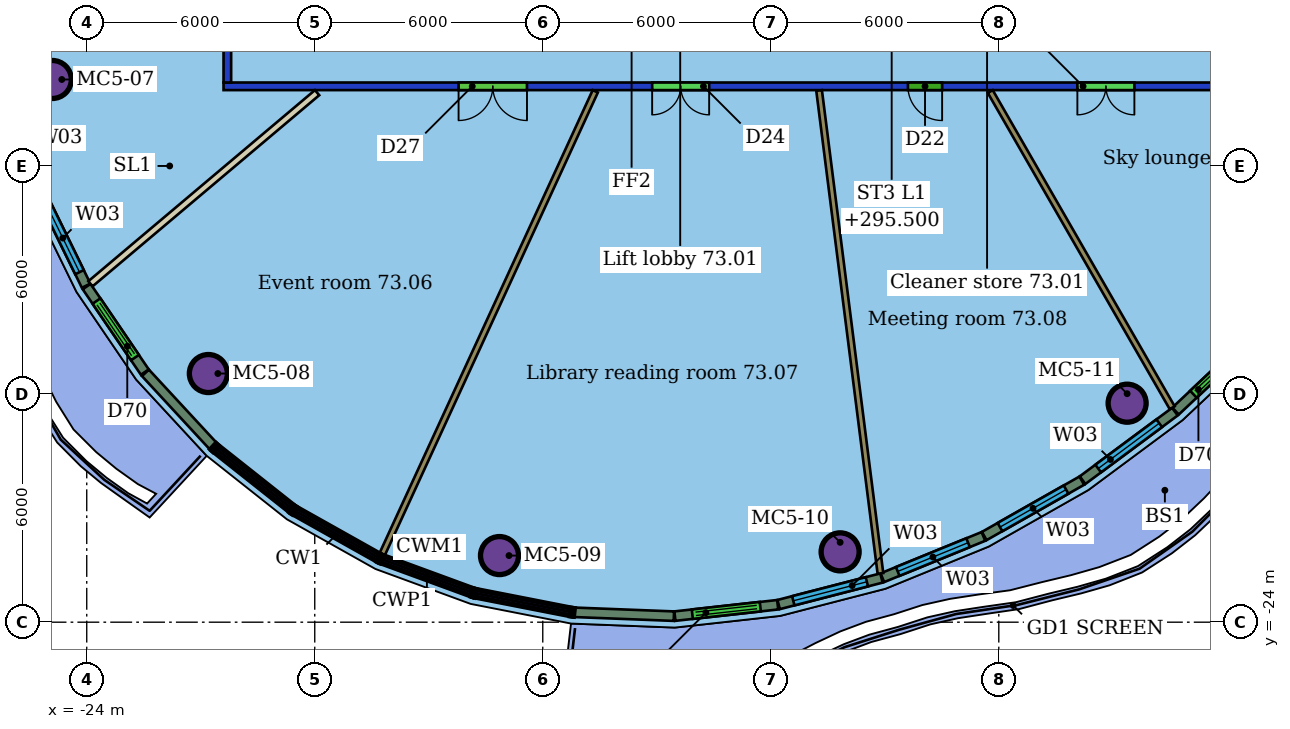
"""IFC4 building model, lengths in metres.
Left out: names, types, materials, properties, quantities, classifications, styles, units other than length and angle.
Written with IfcOpenShell. Run it as: python <this file> out.ifc"""

import sys

from ifc_helpers import new_model, si_unit, direction, frame, frame_2d, origin, origin_2d, place, context, subcontext, project, spatial, rectangle, hollow_circle, extrude, element, fill, save


model = new_model("IFC4")
c1 = context("Model", 3, precision=1e-05, world=origin(), true_north=direction((0.0, 1.0)))
c2 = subcontext(c1, "Body", "Model", "MODEL_VIEW")
j1 = project(units=[si_unit("LENGTHUNIT", "METRE"), si_unit("PLANEANGLEUNIT", "RADIAN")], contexts=[c1])
p1 = place(None, origin())
s1 = spatial("IfcSite", under=j1, at=p1, CompositionType="ELEMENT")
p2 = place(p1, origin())
s2 = spatial("IfcBuilding", under=s1, at=p2, CompositionType="ELEMENT")
p3 = place(p2, frame((0.0, 0.0, 293.7)))
s3 = spatial("IfcBuildingStorey", under=s2, at=p3, CompositionType="ELEMENT", Elevation=293.7)
for number, where, z_axis, x_axis in (
    (1, (-24.906, -9.72, 0.0), (0.0, 0.0, 1.0), (1.0, 0.0, 0.0)),
    (2, (-20.8, -17.457, 0.0), (0.0, 0.0, 1.0), (1.0, 0.0, 0.0)),
    (3, (-13.138, -22.247, 0.0), (0.0, 0.0, 1.0), (1.0, 0.0, 0.0)),
    (4, (-4.175, -22.149, 0.0), (0.0, 0.0, 1.0), (1.0, 0.0, 0.0)),
    (5, (3.377, -18.238, 0.0), (0.0, 0.0, 1.0), (1.0, 0.0, 0.0)),
):
    element("IfcColumn", number, at=place(p3, frame(where, z_axis=z_axis, x_axis=x_axis)), inside=s3, PredefinedType="COLUMN", context=c2, shape_type="SweptSolid", body=[
        extrude(hollow_circle(Radius=0.5, WallThickness=0.04, at=origin_2d()), origin(), (0.0, 0.0, 1.0), 3.45),
    ])
p4 = place(p3, frame((8.4, -9.9, 0.0), z_axis=(0.0, 0.0, 1.0), x_axis=(-1.0, 0.0, 0.0)))
e6 = element("IfcWall", 6, at=p4, inside=s3, PredefinedType="PARTITIONING", context=c2, shape_type="SweptSolid", body=[
    extrude(rectangle(XDim=28.8, YDim=0.2, at=frame_2d((14.4, 0.0))), origin(), (0.0, 0.0, 1.0), 3.1),
])
p5 = place(p4, frame((20.815, 0.0, 0.0)))
e7 = element("IfcOpeningElement", 7, at=p5, cuts=e6, PredefinedType="OPENING", context=c2, shape_type="SweptSolid", body=[
    extrude(rectangle(XDim=1.8, YDim=2.4, at=frame_2d((0.9, 1.2))), frame((0.0, 0.11, 0.0), z_axis=(0.0, -1.0, 0.0), x_axis=(1.0, 0.0, 0.0)), (0.0, 0.0, 1.0), 0.22),
])
p6 = place(p4, frame((16.021, 0.0, 0.0)))
e8 = element("IfcOpeningElement", 8, at=p6, cuts=e6, PredefinedType="OPENING", context=c2, shape_type="SweptSolid", body=[
    extrude(rectangle(XDim=1.5, YDim=2.1, at=frame_2d((0.75, 1.05))), frame((0.0, 0.11, 0.0), z_axis=(0.0, -1.0, 0.0), x_axis=(1.0, 0.0, 0.0)), (0.0, 0.0, 1.0), 0.22),
])
p7 = place(p4, frame((9.891, 0.0, 0.0)))
e9 = element("IfcOpeningElement", 9, at=p7, cuts=e6, PredefinedType="OPENING", context=c2, shape_type="SweptSolid", body=[
    extrude(rectangle(XDim=0.9, YDim=2.1, at=frame_2d((0.45, 1.05))), frame((0.0, 0.11, 0.0), z_axis=(0.0, -1.0, 0.0), x_axis=(1.0, 0.0, 0.0)), (0.0, 0.0, 1.0), 0.22),
])
p8 = place(p4, frame((4.832, 0.0, 0.0)))
e10 = element("IfcOpeningElement", 10, at=p8, cuts=e6, PredefinedType="OPENING", context=c2, shape_type="SweptSolid", body=[
    extrude(rectangle(XDim=1.5, YDim=2.1, at=frame_2d((0.75, 1.05))), frame((0.0, 0.11, 0.0), z_axis=(0.0, -1.0, 0.0), x_axis=(1.0, 0.0, 0.0)), (0.0, 0.0, 1.0), 0.22),
])
p9 = place(p3, frame((-20.3, -9.8, 0.0), z_axis=(0.0, 0.0, 1.0), x_axis=(0.0, 1.0, 0.0)))
e11 = element("IfcWall", 11, at=p9, inside=s3, PredefinedType="PARTITIONING", context=c2, shape_type="SweptSolid", body=[
    extrude(rectangle(XDim=19.6, YDim=0.2, at=frame_2d((9.8, 0.0))), origin(), (0.0, 0.0, 1.0), 3.1),
])
p10 = place(p9, frame((8.147, 0.0, 0.0)))
e12 = element("IfcOpeningElement", 12, at=p10, cuts=e11, PredefinedType="OPENING", context=c2, shape_type="SweptSolid", body=[
    extrude(rectangle(XDim=1.5, YDim=2.1, at=frame_2d((0.75, 1.05))), frame((0.0, 0.11, 0.0), z_axis=(0.0, -1.0, 0.0), x_axis=(1.0, 0.0, 0.0)), (0.0, 0.0, 1.0), 0.22),
])
p11 = place(p9, frame((4.031, 0.0, 0.0)))
e13 = element("IfcOpeningElement", 13, at=p11, cuts=e11, PredefinedType="OPENING", context=c2, shape_type="SweptSolid", body=[
    extrude(rectangle(XDim=1.0, YDim=2.1, at=frame_2d((0.5, 1.05))), frame((0.0, 0.11, 0.0), z_axis=(0.0, -1.0, 0.0), x_axis=(1.0, 0.0, 0.0)), (0.0, 0.0, 1.0), 0.22),
])
p12 = place(p3, frame((-23.902, -15.095, 0.0), z_axis=(0.0, 0.0, 1.0), x_axis=(0.764496313842, 0.644628099079, 0.0)))
e14 = element("IfcWall", 14, at=p12, inside=s3, PredefinedType="PARTITIONING", context=c2, shape_type="SweptSolid", body=[
    extrude(rectangle(XDim=7.801, YDim=0.175, at=frame_2d((3.9, 0.0))), origin(), (0.0, 0.0, 1.0), 3.45),
])
p13 = place(p3, frame((-16.226, -22.213, 0.0), z_axis=(0.0, 0.0, 1.0), x_axis=(0.418174840515, 0.908366557487, 0.0)))
e15 = element("IfcWall", 15, at=p13, inside=s3, PredefinedType="PARTITIONING", context=c2, shape_type="SweptSolid", body=[
    extrude(rectangle(XDim=13.411, YDim=0.15, at=frame_2d((6.706, 0.0))), origin(), (0.0, 0.0, 1.0), 3.45),
])
p14 = place(p3, frame((-3.115, -22.716, 0.0), z_axis=(0.0, 0.0, 1.0), x_axis=(-0.125990997463, 0.992031384866, 0.0)))
e16 = element("IfcWall", 16, at=p14, inside=s3, PredefinedType="PARTITIONING", context=c2, shape_type="SweptSolid", body=[
    extrude(rectangle(XDim=12.809, YDim=0.15, at=frame_2d((6.404, 0.0))), origin(), (0.0, 0.0, 1.0), 3.45),
])
p15 = place(p3, frame((4.563, -18.357, 0.0), z_axis=(0.0, 0.0, 1.0), x_axis=(-0.498722463037, 0.86676173477, 0.0)))
e17 = element("IfcWall", 17, at=p15, inside=s3, PredefinedType="PARTITIONING", context=c2, shape_type="SweptSolid", body=[
    extrude(rectangle(XDim=9.599, YDim=0.15, at=frame_2d((4.799, 0.0))), origin(), (0.0, 0.0, 1.0), 3.45),
])
p16 = place(p3, frame((-25.244, -12.637, 0.0), z_axis=(0.0, 0.0, 1.0), x_axis=(0.439683351092, -0.898152854904, 0.0)))
e18 = element("IfcWall", 18, at=p16, inside=s3, PredefinedType="SOLIDWALL", context=c2, shape_type="SweptSolid", body=[
    extrude(rectangle(XDim=2.794, YDim=0.25, at=frame_2d((1.397, 0.0))), origin(), (0.0, 0.0, 1.0), 3.15),
])
p17 = place(p16, frame((0.397, 0.0, 0.9)))
e19 = element("IfcOpeningElement", 19, at=p17, cuts=e18, PredefinedType="OPENING", context=c2, shape_type="SweptSolid", body=[
    extrude(rectangle(XDim=2.0, YDim=2.1, at=frame_2d((1.0, 1.05))), frame((0.0, 0.135, 0.0), z_axis=(0.0, -1.0, 0.0), x_axis=(1.0, 0.0, 0.0)), (0.0, 0.0, 1.0), 0.27),
])
p18 = place(p3, frame((-24.003, -15.169, 0.0), z_axis=(0.0, 0.0, 1.0), x_axis=(0.562624043307, -0.826712879961, 0.0)))
e20 = element("IfcWall", 20, at=p18, inside=s3, PredefinedType="SOLIDWALL", context=c2, shape_type="SweptSolid", body=[
    extrude(rectangle(XDim=2.722, YDim=0.25, at=frame_2d((1.361, 0.0))), origin(), (0.0, 0.0, 1.0), 3.15),
])
p19 = place(p18, frame((0.461, 0.0, 0.0)))
e21 = element("IfcOpeningElement", 21, at=p19, cuts=e20, PredefinedType="OPENING", context=c2, shape_type="SweptSolid", body=[
    extrude(rectangle(XDim=1.8, YDim=2.4, at=frame_2d((0.9, 1.2))), frame((0.0, 0.135, 0.0), z_axis=(0.0, -1.0, 0.0), x_axis=(1.0, 0.0, 0.0)), (0.0, 0.0, 1.0), 0.27),
])
for number, where, z_axis, x_axis in (
    (22, (-22.455, -17.44, 0.0), (0.0, 0.0, 1.0), (0.679, -0.734, 0.0)),
    (23, (-11.167, -23.74, 0.0), (0.0, 0.0, 1.0), (0.999, -0.039, 0.0)),
):
    element("IfcWall", number, at=place(p3, frame(where, z_axis=z_axis, x_axis=x_axis)), inside=s3, PredefinedType="SOLIDWALL", context=c2, shape_type="SweptSolid", body=[
        extrude(rectangle(XDim=2.619, YDim=0.25, at=frame_2d((1.31, 0.0))), origin(), (0.0, 0.0, 1.0), 3.15),
    ])
p20 = place(p3, frame((-8.523, -23.84, 0.0), z_axis=(0.0, 0.0, 1.0), x_axis=(0.993924144264, 0.110067231499, 0.0)))
e24 = element("IfcWall", 24, at=p20, inside=s3, PredefinedType="SOLIDWALL", context=c2, shape_type="SweptSolid", body=[
    extrude(rectangle(XDim=2.722, YDim=0.25, at=frame_2d((1.361, 0.0))), origin(), (0.0, 0.0, 1.0), 3.15),
])
p21 = place(p20, frame((0.461, 0.0, 0.0)))
e25 = element("IfcOpeningElement", 25, at=p21, cuts=e24, PredefinedType="OPENING", context=c2, shape_type="SweptSolid", body=[
    extrude(rectangle(XDim=1.8, YDim=2.4, at=frame_2d((0.9, 1.2))), frame((0.0, 0.135, 0.0), z_axis=(0.0, -1.0, 0.0), x_axis=(1.0, 0.0, 0.0)), (0.0, 0.0, 1.0), 0.27),
])
p22 = place(p3, frame((-5.793, -23.536, 0.0), z_axis=(0.0, 0.0, 1.0), x_axis=(0.968247991757, 0.249991652777, 0.0)))
e26 = element("IfcWall", 26, at=p22, inside=s3, PredefinedType="SOLIDWALL", context=c2, shape_type="SweptSolid", body=[
    extrude(rectangle(XDim=2.794, YDim=0.25, at=frame_2d((1.397, 0.0))), origin(), (0.0, 0.0, 1.0), 3.15),
])
p23 = place(p22, frame((0.397, 0.0, 0.9)))
e27 = element("IfcOpeningElement", 27, at=p23, cuts=e26, PredefinedType="OPENING", context=c2, shape_type="SweptSolid", body=[
    extrude(rectangle(XDim=2.0, YDim=2.1, at=frame_2d((1.0, 1.05))), frame((0.0, 0.135, 0.0), z_axis=(0.0, -1.0, 0.0), x_axis=(1.0, 0.0, 0.0)), (0.0, 0.0, 1.0), 0.27),
])
p24 = place(p3, frame((-3.064, -22.83, 0.0), z_axis=(0.0, 0.0, 1.0), x_axis=(0.925732306154, 0.378179451243, 0.0)))
e28 = element("IfcWall", 28, at=p24, inside=s3, PredefinedType="SOLIDWALL", context=c2, shape_type="SweptSolid", body=[
    extrude(rectangle(XDim=2.873, YDim=0.25, at=frame_2d((1.437, 0.0))), origin(), (0.0, 0.0, 1.0), 3.15),
])
p25 = place(p24, frame((0.436, 0.0, 0.9)))
e29 = element("IfcOpeningElement", 29, at=p25, cuts=e28, PredefinedType="OPENING", context=c2, shape_type="SweptSolid", body=[
    extrude(rectangle(XDim=2.0, YDim=2.1, at=frame_2d((1.0, 1.05))), frame((0.0, 0.135, 0.0), z_axis=(0.0, -1.0, 0.0), x_axis=(1.0, 0.0, 0.0)), (0.0, 0.0, 1.0), 0.27),
])
p26 = place(p3, frame((-0.383, -21.733, 0.0), z_axis=(0.0, 0.0, 1.0), x_axis=(0.869684955628, 0.493607210194, 0.0)))
e30 = element("IfcWall", 30, at=p26, inside=s3, PredefinedType="SOLIDWALL", context=c2, shape_type="SweptSolid", body=[
    extrude(rectangle(XDim=2.952, YDim=0.25, at=frame_2d((1.476, 0.0))), origin(), (0.0, 0.0, 1.0), 3.15),
])
p27 = place(p26, frame((0.476, 0.0, 0.9)))
e31 = element("IfcOpeningElement", 31, at=p27, cuts=e30, PredefinedType="OPENING", context=c2, shape_type="SweptSolid", body=[
    extrude(rectangle(XDim=2.0, YDim=2.1, at=frame_2d((1.0, 1.05))), frame((0.0, 0.135, 0.0), z_axis=(0.0, -1.0, 0.0), x_axis=(1.0, 0.0, 0.0)), (0.0, 0.0, 1.0), 0.27),
])
p28 = place(p3, frame((2.204, -20.263, 0.0), z_axis=(0.0, 0.0, 1.0), x_axis=(0.803029531198, 0.595939235178, 0.0)))
e32 = element("IfcWall", 32, at=p28, inside=s3, PredefinedType="SOLIDWALL", context=c2, shape_type="SweptSolid", body=[
    extrude(rectangle(XDim=3.026, YDim=0.25, at=frame_2d((1.513, 0.0))), origin(), (0.0, 0.0, 1.0), 3.15),
])
p29 = place(p28, frame((0.513, 0.0, 0.9)))
e33 = element("IfcOpeningElement", 33, at=p29, cuts=e32, PredefinedType="OPENING", context=c2, shape_type="SweptSolid", body=[
    extrude(rectangle(XDim=2.0, YDim=2.1, at=frame_2d((1.0, 1.05))), frame((0.0, 0.135, 0.0), z_axis=(0.0, -1.0, 0.0), x_axis=(1.0, 0.0, 0.0)), (0.0, 0.0, 1.0), 0.27),
])
p30 = place(p3, frame((4.651, -18.445, 0.0), z_axis=(0.0, 0.0, 1.0), x_axis=(0.728070141896, 0.685502639295, 0.0)))
e34 = element("IfcWall", 34, at=p30, inside=s3, PredefinedType="SOLIDWALL", context=c2, shape_type="SweptSolid", body=[
    extrude(rectangle(XDim=3.091, YDim=0.25, at=frame_2d((1.546, 0.0))), origin(), (0.0, 0.0, 1.0), 3.15),
])
p31 = place(p30, frame((0.646, 0.0, 0.0)))
e35 = element("IfcOpeningElement", 35, at=p31, cuts=e34, PredefinedType="OPENING", context=c2, shape_type="SweptSolid", body=[
    extrude(rectangle(XDim=1.8, YDim=2.4, at=frame_2d((0.9, 1.2))), frame((0.0, 0.135, 0.0), z_axis=(0.0, -1.0, 0.0), x_axis=(1.0, 0.0, 0.0)), (0.0, 0.0, 1.0), 0.27),
])
p32 = place(p5, origin())
e36 = element("IfcDoor", 36, at=p32, inside=s3, OperationType="DOUBLE_DOOR_SINGLE_SWING", PredefinedType="DOOR", context=c2, shape_type="SweptSolid", body=[
    extrude(rectangle(XDim=1.8, YDim=2.4, at=frame_2d((0.9, 1.2))), frame((0.0, 0.025, 0.0), z_axis=(0.0, -1.0, 0.0), x_axis=(1.0, 0.0, 0.0)), (0.0, 0.0, 1.0), 0.05),
])
fill(e7, e36)
p33 = place(p6, origin())
e37 = element("IfcDoor", 37, at=p33, inside=s3, OperationType="DOUBLE_DOOR_SINGLE_SWING", PredefinedType="DOOR", context=c2, shape_type="SweptSolid", body=[
    extrude(rectangle(XDim=1.5, YDim=2.1, at=frame_2d((0.75, 1.05))), frame((0.0, 0.025, 0.0), z_axis=(0.0, -1.0, 0.0), x_axis=(1.0, 0.0, 0.0)), (0.0, 0.0, 1.0), 0.05),
])
fill(e8, e37)
p34 = place(p7, origin())
e38 = element("IfcDoor", 38, at=p34, inside=s3, OperationType="SINGLE_SWING_LEFT", PredefinedType="DOOR", context=c2, shape_type="SweptSolid", body=[
    extrude(rectangle(XDim=0.9, YDim=2.1, at=frame_2d((0.45, 1.05))), frame((0.0, 0.025, 0.0), z_axis=(0.0, -1.0, 0.0), x_axis=(1.0, 0.0, 0.0)), (0.0, 0.0, 1.0), 0.05),
])
fill(e9, e38)
p35 = place(p8, origin())
e39 = element("IfcDoor", 39, at=p35, inside=s3, OperationType="DOUBLE_DOOR_SINGLE_SWING", PredefinedType="DOOR", context=c2, shape_type="SweptSolid", body=[
    extrude(rectangle(XDim=1.5, YDim=2.1, at=frame_2d((0.75, 1.05))), frame((0.0, 0.025, 0.0), z_axis=(0.0, -1.0, 0.0), x_axis=(1.0, 0.0, 0.0)), (0.0, 0.0, 1.0), 0.05),
])
fill(e10, e39)
p36 = place(p17, origin())
e40 = element("IfcWindow", 40, at=p36, inside=s3, PartitioningType="SINGLE_PANEL", PredefinedType="WINDOW", context=c2, shape_type="SweptSolid", body=[
    extrude(rectangle(XDim=2.0, YDim=2.1, at=frame_2d((1.0, 1.05))), frame((0.0, 0.03, 0.0), z_axis=(0.0, -1.0, 0.0), x_axis=(1.0, 0.0, 0.0)), (0.0, 0.0, 1.0), 0.06),
])
fill(e19, e40)
p37 = place(p19, origin())
e41 = element("IfcDoor", 41, at=p37, inside=s3, OperationType="DOUBLE_DOOR_SLIDING", PredefinedType="DOOR", context=c2, shape_type="SweptSolid", body=[
    extrude(rectangle(XDim=1.8, YDim=2.4, at=frame_2d((0.9, 1.2))), frame((0.0, 0.025, 0.0), z_axis=(0.0, -1.0, 0.0), x_axis=(1.0, 0.0, 0.0)), (0.0, 0.0, 1.0), 0.05),
])
fill(e21, e41)
p38 = place(p21, origin())
e42 = element("IfcDoor", 42, at=p38, inside=s3, OperationType="DOUBLE_DOOR_SLIDING", PredefinedType="DOOR", context=c2, shape_type="SweptSolid", body=[
    extrude(rectangle(XDim=1.8, YDim=2.4, at=frame_2d((0.9, 1.2))), frame((0.0, 0.025, 0.0), z_axis=(0.0, -1.0, 0.0), x_axis=(1.0, 0.0, 0.0)), (0.0, 0.0, 1.0), 0.05),
])
fill(e25, e42)
p39 = place(p23, origin())
e43 = element("IfcWindow", 43, at=p39, inside=s3, PartitioningType="SINGLE_PANEL", PredefinedType="WINDOW", context=c2, shape_type="SweptSolid", body=[
    extrude(rectangle(XDim=2.0, YDim=2.1, at=frame_2d((1.0, 1.05))), frame((0.0, 0.03, 0.0), z_axis=(0.0, -1.0, 0.0), x_axis=(1.0, 0.0, 0.0)), (0.0, 0.0, 1.0), 0.06),
])
fill(e27, e43)
p40 = place(p25, origin())
e44 = element("IfcWindow", 44, at=p40, inside=s3, PartitioningType="SINGLE_PANEL", PredefinedType="WINDOW", context=c2, shape_type="SweptSolid", body=[
    extrude(rectangle(XDim=2.0, YDim=2.1, at=frame_2d((1.0, 1.05))), frame((0.0, 0.03, 0.0), z_axis=(0.0, -1.0, 0.0), x_axis=(1.0, 0.0, 0.0)), (0.0, 0.0, 1.0), 0.06),
])
fill(e29, e44)
p41 = place(p27, origin())
e45 = element("IfcWindow", 45, at=p41, inside=s3, PartitioningType="SINGLE_PANEL", PredefinedType="WINDOW", context=c2, shape_type="SweptSolid", body=[
    extrude(rectangle(XDim=2.0, YDim=2.1, at=frame_2d((1.0, 1.05))), frame((0.0, 0.03, 0.0), z_axis=(0.0, -1.0, 0.0), x_axis=(1.0, 0.0, 0.0)), (0.0, 0.0, 1.0), 0.06),
])
fill(e31, e45)
p42 = place(p29, origin())
e46 = element("IfcWindow", 46, at=p42, inside=s3, PartitioningType="SINGLE_PANEL", PredefinedType="WINDOW", context=c2, shape_type="SweptSolid", body=[
    extrude(rectangle(XDim=2.0, YDim=2.1, at=frame_2d((1.0, 1.05))), frame((0.0, 0.03, 0.0), z_axis=(0.0, -1.0, 0.0), x_axis=(1.0, 0.0, 0.0)), (0.0, 0.0, 1.0), 0.06),
])
fill(e33, e46)
p43 = place(p31, origin())
e47 = element("IfcDoor", 47, at=p43, inside=s3, OperationType="DOUBLE_DOOR_SLIDING", PredefinedType="DOOR", context=c2, shape_type="SweptSolid", body=[
    extrude(rectangle(XDim=1.8, YDim=2.4, at=frame_2d((0.9, 1.2))), frame((0.0, 0.025, 0.0), z_axis=(0.0, -1.0, 0.0), x_axis=(1.0, 0.0, 0.0)), (0.0, 0.0, 1.0), 0.05),
])
fill(e35, e47)
save(model, sys.argv[1])
